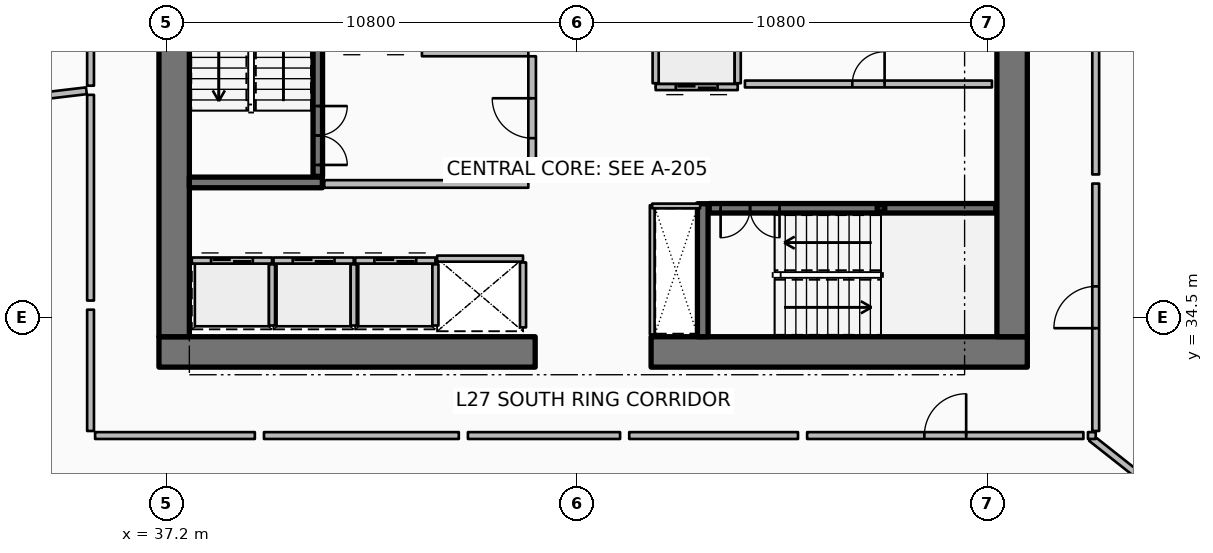
"""IFC4 building model, lengths in metres.
Left out: names, types, materials, properties, quantities, classifications, styles, units other than length and angle.
Written with IfcOpenShell. Run it as: python <this file> out.ifc"""

import sys

from ifc_helpers import new_model, si_unit, direction, frame, frame_2d, origin, origin_2d, place, context, subcontext, project, spatial, rectangle, hollow_rectangle, extrude, element, fill, save


model = new_model("IFC4")
c1 = context("Model", 3, precision=1e-05, world=origin(), true_north=direction((0.0, 1.0)))
c2 = subcontext(c1, "Body", "Model", "MODEL_VIEW")
j1 = project(units=[si_unit("LENGTHUNIT", "METRE"), si_unit("PLANEANGLEUNIT", "RADIAN")], contexts=[c1])
p1 = place(None, origin())
s1 = spatial("IfcSite", under=j1, at=p1, CompositionType="ELEMENT")
p2 = place(p1, origin())
s2 = spatial("IfcBuilding", under=s1, at=p2, CompositionType="ELEMENT")
p3 = place(p2, frame((0.0, 0.0, 108.9)))
s3 = spatial("IfcBuildingStorey", under=s2, at=p3, CompositionType="ELEMENT", Elevation=108.9)
p4 = place(p3, frame((37.0, 33.6, 0.0), z_axis=(0.0, 0.0, 1.0), x_axis=(1.0, 0.0, 0.0)))
e1 = element("IfcWall", 1, at=p4, inside=s3, PredefinedType="SHEAR", context=c2, shape_type="SweptSolid", body=[
    extrude(rectangle(XDim=9.9, YDim=0.8, at=frame_2d((4.95, 0.0))), origin(), (0.0, 0.0, 1.0), 3.75),
])
p5 = place(p3, frame((49.95, 33.6, 0.0), z_axis=(0.0, 0.0, 1.0), x_axis=(1.0, 0.0, 0.0)))
e2 = element("IfcWall", 2, at=p5, inside=s3, PredefinedType="SHEAR", context=c2, shape_type="SweptSolid", body=[
    extrude(rectangle(XDim=9.9, YDim=0.8, at=frame_2d((4.95, 0.0))), origin(), (0.0, 0.0, 1.0), 3.75),
])
for number, where, z_axis, x_axis in (
    (3, (37.4, 34.0, 0.0), (0.0, 0.0, 1.0), (0.0, 1.0, 0.0)),
    (4, (59.45, 34.0, 0.0), (0.0, 0.0, 1.0), (0.0, 1.0, 0.0)),
):
    element("IfcWall", number, at=place(p3, frame(where, z_axis=z_axis, x_axis=x_axis)), inside=s3, PredefinedType="SHEAR", context=c2, shape_type="SweptSolid", body=[
        extrude(rectangle(XDim=16.0, YDim=0.8, at=frame_2d((8.0, 0.0))), origin(), (0.0, 0.0, 1.0), 3.75),
    ])
for number, where, z_axis, x_axis in (
    (5, (37.8, 38.06, 0.0), (0.0, 0.0, 1.0), (1.0, 0.0, 0.0)),
    (6, (51.31, 34.0, 0.0), (0.0, 0.0, 1.0), (0.0, 1.0, 0.0)),
):
    element("IfcWall", number, at=place(p3, frame(where, z_axis=z_axis, x_axis=x_axis)), inside=s3, PredefinedType="SHEAR", context=c2, shape_type="SweptSolid", body=[
        extrude(rectangle(XDim=3.5, YDim=0.28, at=frame_2d((1.75, 0.0))), origin(), (0.0, 0.0, 1.0), 3.75),
    ])
p6 = place(p3, frame((56.0, 37.38, 0.0), z_axis=(0.0, 0.0, 1.0), x_axis=(1.0, 0.0, 0.0)))
e7 = element("IfcColumn", 7, at=p6, inside=s3, PredefinedType="COLUMN", context=c2, shape_type="SweptSolid", body=[
    extrude(hollow_rectangle(XDim=0.2, YDim=0.2, WallThickness=0.01, InnerFilletRadius=0.01, OuterFilletRadius=0.02, at=origin_2d()), origin(), (0.0, 0.0, 1.0), 1.67),
])
p7 = place(p3, frame((41.18, 38.22, 0.0), z_axis=(0.0, 0.0, 1.0), x_axis=(0.0, 1.0, 0.0)))
e8 = element("IfcWall", 8, at=p7, inside=s3, PredefinedType="SOLIDWALL", context=c2, shape_type="SweptSolid", body=[
    extrude(rectangle(XDim=7.56, YDim=0.25, at=frame_2d((3.78, 0.0))), origin(), (0.0, 0.0, 1.0), 3.5),
])
p8 = place(p7, frame((0.3, 0.0, 0.0)))
e9 = element("IfcOpeningElement", 9, at=p8, cuts=e8, PredefinedType="OPENING", context=c2, shape_type="SweptSolid", body=[
    extrude(rectangle(XDim=1.55, YDim=2.15, at=frame_2d((0.775, 1.075))), frame((0.0, 0.135, 0.0), z_axis=(0.0, -1.0, 0.0), x_axis=(1.0, 0.0, 0.0)), (0.0, 0.0, 1.0), 0.27),
])
p9 = place(p3, frame((51.48, 37.38, 0.0), z_axis=(0.0, 0.0, 1.0), x_axis=(1.0, 0.0, 0.0)))
e10 = element("IfcWall", 10, at=p9, inside=s3, PredefinedType="SOLIDWALL", context=c2, shape_type="SweptSolid", body=[
    extrude(rectangle(XDim=7.54, YDim=0.25, at=frame_2d((3.77, 0.0))), origin(), (0.0, 0.0, 1.0), 3.5),
])
p10 = place(p9, frame((0.3, 0.0, 0.0)))
e11 = element("IfcOpeningElement", 11, at=p10, cuts=e10, PredefinedType="OPENING", context=c2, shape_type="SweptSolid", body=[
    extrude(rectangle(XDim=1.55, YDim=2.15, at=frame_2d((0.775, 1.075))), frame((0.0, 0.135, 0.0), z_axis=(0.0, -1.0, 0.0), x_axis=(1.0, 0.0, 0.0)), (0.0, 0.0, 1.0), 0.27),
])
p11 = place(p3, frame((37.865, 36.005, 0.0), z_axis=(0.0, 0.0, 1.0), x_axis=(1.0, 0.0, 0.0)))
e12 = element("IfcWall", 12, at=p11, inside=s3, PredefinedType="PARTITIONING", context=c2, shape_type="SweptSolid", body=[
    extrude(rectangle(XDim=2.11, YDim=0.16, at=frame_2d((1.055, 0.0))), origin(), (0.0, 0.0, 1.0), 3.5),
])
p12 = place(p11, frame((0.505, 0.0, 0.0)))
e13 = element("IfcOpeningElement", 13, at=p12, cuts=e12, PredefinedType="OPENING", context=c2, shape_type="SweptSolid", body=[
    extrude(rectangle(XDim=1.1, YDim=2.1, at=frame_2d((0.55, 1.05))), frame((0.0, 0.09, 0.0), z_axis=(0.0, -1.0, 0.0), x_axis=(1.0, 0.0, 0.0)), (0.0, 0.0, 1.0), 0.18),
])
p13 = place(p3, frame((39.975, 34.295, 0.0), z_axis=(0.0, 0.0, 1.0), x_axis=(0.0, 1.0, 0.0)))
e14 = element("IfcWall", 14, at=p13, inside=s3, PredefinedType="PARTITIONING", context=c2, shape_type="SweptSolid", body=[
    extrude(rectangle(XDim=1.61, YDim=0.16, at=frame_2d((0.805, 0.0))), origin(), (0.0, 0.0, 1.0), 3.5),
])
p14 = place(p3, frame((40.015, 36.005, 0.0), z_axis=(0.0, 0.0, 1.0), x_axis=(1.0, 0.0, 0.0)))
e15 = element("IfcWall", 15, at=p14, inside=s3, PredefinedType="PARTITIONING", context=c2, shape_type="SweptSolid", body=[
    extrude(rectangle(XDim=2.11, YDim=0.16, at=frame_2d((1.055, 0.0))), origin(), (0.0, 0.0, 1.0), 3.5),
])
p15 = place(p14, frame((0.505, 0.0, 0.0)))
e16 = element("IfcOpeningElement", 16, at=p15, cuts=e15, PredefinedType="OPENING", context=c2, shape_type="SweptSolid", body=[
    extrude(rectangle(XDim=1.1, YDim=2.1, at=frame_2d((0.55, 1.05))), frame((0.0, 0.09, 0.0), z_axis=(0.0, -1.0, 0.0), x_axis=(1.0, 0.0, 0.0)), (0.0, 0.0, 1.0), 0.18),
])
p16 = place(p3, frame((42.125, 34.295, 0.0), z_axis=(0.0, 0.0, 1.0), x_axis=(0.0, 1.0, 0.0)))
e17 = element("IfcWall", 17, at=p16, inside=s3, PredefinedType="PARTITIONING", context=c2, shape_type="SweptSolid", body=[
    extrude(rectangle(XDim=1.61, YDim=0.16, at=frame_2d((0.805, 0.0))), origin(), (0.0, 0.0, 1.0), 3.5),
])
p17 = place(p3, frame((42.165, 36.005, 0.0), z_axis=(0.0, 0.0, 1.0), x_axis=(1.0, 0.0, 0.0)))
e18 = element("IfcWall", 18, at=p17, inside=s3, PredefinedType="PARTITIONING", context=c2, shape_type="SweptSolid", body=[
    extrude(rectangle(XDim=2.11, YDim=0.16, at=frame_2d((1.055, 0.0))), origin(), (0.0, 0.0, 1.0), 3.5),
])
p18 = place(p17, frame((0.505, 0.0, 0.0)))
e19 = element("IfcOpeningElement", 19, at=p18, cuts=e18, PredefinedType="OPENING", context=c2, shape_type="SweptSolid", body=[
    extrude(rectangle(XDim=1.1, YDim=2.1, at=frame_2d((0.55, 1.05))), frame((0.0, 0.09, 0.0), z_axis=(0.0, -1.0, 0.0), x_axis=(1.0, 0.0, 0.0)), (0.0, 0.0, 1.0), 0.18),
])
p19 = place(p3, frame((44.275, 34.295, 0.0), z_axis=(0.0, 0.0, 1.0), x_axis=(0.0, 1.0, 0.0)))
e20 = element("IfcWall", 20, at=p19, inside=s3, PredefinedType="PARTITIONING", context=c2, shape_type="SweptSolid", body=[
    extrude(rectangle(XDim=1.61, YDim=0.16, at=frame_2d((0.805, 0.0))), origin(), (0.0, 0.0, 1.0), 3.5),
])
p20 = place(p3, frame((44.32, 36.055, 0.0), z_axis=(0.0, 0.0, 1.0), x_axis=(1.0, 0.0, 0.0)))
e21 = element("IfcWall", 21, at=p20, inside=s3, PredefinedType="PARTITIONING", context=c2, shape_type="SweptSolid", body=[
    extrude(rectangle(XDim=2.26, YDim=0.16, at=frame_2d((1.13, 0.0))), origin(), (0.0, 0.0, 1.0), 3.5),
])
p21 = place(p3, frame((46.58, 34.245, 0.0), z_axis=(0.0, 0.0, 1.0), x_axis=(0.0, 1.0, 0.0)))
e22 = element("IfcWall", 22, at=p21, inside=s3, PredefinedType="PARTITIONING", context=c2, shape_type="SweptSolid", body=[
    extrude(rectangle(XDim=1.71, YDim=0.16, at=frame_2d((0.855, 0.0))), origin(), (0.0, 0.0, 1.0), 3.5),
])
p22 = place(p3, frame((52.23, 40.57, 0.0), z_axis=(0.0, 0.0, 1.0), x_axis=(-1.0, 0.0, 0.0)))
e23 = element("IfcWall", 23, at=p22, inside=s3, PredefinedType="PARTITIONING", context=c2, shape_type="SweptSolid", body=[
    extrude(rectangle(XDim=2.16, YDim=0.16, at=frame_2d((1.08, 0.0))), origin(), (0.0, 0.0, 1.0), 3.5),
])
p23 = place(p22, frame((0.53, 0.0, 0.0)))
e24 = element("IfcOpeningElement", 24, at=p23, cuts=e23, PredefinedType="OPENING", context=c2, shape_type="SweptSolid", body=[
    extrude(rectangle(XDim=1.1, YDim=2.1, at=frame_2d((0.55, 1.05))), frame((0.0, 0.09, 0.0), z_axis=(0.0, -1.0, 0.0), x_axis=(1.0, 0.0, 0.0)), (0.0, 0.0, 1.0), 0.18),
])
for number, where, z_axis, x_axis in (
    (25, (52.23, 40.67, 0.0), (0.0, 0.0, 1.0), (0.0, 1.0, 0.0)),
    (26, (50.07, 40.67, 0.0), (0.0, 0.0, 1.0), (0.0, 1.0, 0.0)),
):
    element("IfcWall", number, at=place(p3, frame(where, z_axis=z_axis, x_axis=x_axis)), inside=s3, PredefinedType="PARTITIONING", context=c2, shape_type="SweptSolid", body=[
        extrude(rectangle(XDim=2.16, YDim=0.16, at=frame_2d((1.08, 0.0))), origin(), (0.0, 0.0, 1.0), 3.5),
    ])
p24 = place(p3, frame((52.42, 40.65, 0.0), z_axis=(0.0, 0.0, 1.0), x_axis=(1.0, 0.0, 0.0)))
e27 = element("IfcWall", 27, at=p24, inside=s3, PredefinedType="PARTITIONING", context=c2, shape_type="SweptSolid", body=[
    extrude(rectangle(XDim=6.5, YDim=0.18, at=frame_2d((3.25, 0.0))), origin(), (0.0, 0.0, 1.0), 3.5),
])
p25 = place(p24, frame((2.825, 0.0, 0.0)))
e28 = element("IfcOpeningElement", 28, at=p25, cuts=e27, PredefinedType="OPENING", context=c2, shape_type="SweptSolid", body=[
    extrude(rectangle(XDim=0.85, YDim=2.06, at=frame_2d((0.425, 1.03))), frame((0.0, 0.1, 0.0), z_axis=(0.0, -1.0, 0.0), x_axis=(1.0, 0.0, 0.0)), (0.0, 0.0, 1.0), 0.2),
])
p26 = place(p3, frame((41.35, 38.02, 0.0), z_axis=(0.0, 0.0, 1.0), x_axis=(1.0, 0.0, 0.0)))
e29 = element("IfcWall", 29, at=p26, inside=s3, PredefinedType="PARTITIONING", context=c2, shape_type="SweptSolid", body=[
    extrude(rectangle(XDim=5.37, YDim=0.2, at=frame_2d((2.685, 0.0))), origin(), (0.0, 0.0, 1.0), 3.5),
])
p27 = place(p3, frame((43.92, 41.48, 0.0), z_axis=(0.0, 0.0, 1.0), x_axis=(1.0, 0.0, 0.0)))
e30 = element("IfcWall", 30, at=p27, inside=s3, PredefinedType="PARTITIONING", context=c2, shape_type="SweptSolid", body=[
    extrude(rectangle(XDim=2.8, YDim=0.2, at=frame_2d((1.4, 0.0))), origin(), (0.0, 0.0, 1.0), 3.5),
])
p28 = place(p3, frame((46.82, 38.12, 0.0), z_axis=(0.0, 0.0, 1.0), x_axis=(0.0, 1.0, 0.0)))
e31 = element("IfcWall", 31, at=p28, inside=s3, PredefinedType="PARTITIONING", context=c2, shape_type="SweptSolid", body=[
    extrude(rectangle(XDim=3.26, YDim=0.2, at=frame_2d((1.63, 0.0))), origin(), (0.0, 0.0, 1.0), 3.5),
])
p29 = place(p28, frame((1.105, 0.0, 0.0)))
e32 = element("IfcOpeningElement", 32, at=p29, cuts=e31, PredefinedType="OPENING", context=c2, shape_type="SweptSolid", body=[
    extrude(rectangle(XDim=1.05, YDim=2.1, at=frame_2d((0.525, 1.05))), frame((0.0, 0.11, 0.0), z_axis=(0.0, -1.0, 0.0), x_axis=(1.0, 0.0, 0.0)), (0.0, 0.0, 1.0), 0.22),
])
p30 = place(p3, frame((49.98, 34.06, 0.0), z_axis=(0.0, 0.0, 1.0), x_axis=(0.0, 1.0, 0.0)))
e33 = element("IfcWall", 33, at=p30, inside=s3, PredefinedType="PARTITIONING", context=c2, shape_type="SweptSolid", body=[
    extrude(rectangle(XDim=3.4, YDim=0.125, at=frame_2d((1.7, 0.0))), origin(), (0.0, 0.0, 1.0), 2.94),
])
p31 = place(p3, frame((49.98, 37.44, 0.0), z_axis=(0.0, 0.0, 1.0), x_axis=(1.0, 0.0, 0.0)))
e34 = element("IfcWall", 34, at=p31, inside=s3, PredefinedType="PARTITIONING", context=c2, shape_type="SweptSolid", body=[
    extrude(rectangle(XDim=1.26, YDim=0.125, at=frame_2d((0.63, 0.0))), origin(), (0.0, 0.0, 1.0), 2.94),
])
p32 = place(p3, frame((35.091, 40.472, 0.0), z_axis=(0.0, 0.0, 1.0), x_axis=(-0.99306845132, -0.117537445069, 0.0)))
e35 = element("IfcWall", 35, at=p32, inside=s3, PredefinedType="PARTITIONING", context=c2, shape_type="SweptSolid", body=[
    extrude(rectangle(XDim=16.48, YDim=0.18, at=frame_2d((8.24, 0.0))), origin(), (0.0, 0.0, 1.0), 2.94),
])
p33 = place(p3, frame((61.532, 31.332, 0.0), z_axis=(0.0, 0.0, 1.0), x_axis=(0.785307944478, -0.619105348337, 0.0)))
e36 = element("IfcWall", 36, at=p33, inside=s3, PredefinedType="PARTITIONING", context=c2, shape_type="SweptSolid", body=[
    extrude(rectangle(XDim=9.006, YDim=0.18, at=frame_2d((4.503, 0.0))), origin(), (0.0, 0.0, 1.0), 2.94),
])
p34 = place(p3, frame((35.2, 45.49, 0.0), z_axis=(0.0, 0.0, 1.0), x_axis=(0.0, -1.0, 0.0)))
e37 = element("IfcWall", 37, at=p34, inside=s3, PredefinedType="PARTITIONING", context=c2, shape_type="SweptSolid", body=[
    extrude(rectangle(XDim=4.885, YDim=0.18, at=frame_2d((2.442, 0.0))), origin(), (0.0, 0.0, 1.0), 2.94),
])
p35 = place(p3, frame((54.056, 31.4, 0.0), z_axis=(0.0, 0.0, 1.0), x_axis=(1.0, 0.0, 0.0)))
e38 = element("IfcWall", 38, at=p35, inside=s3, PredefinedType="PARTITIONING", context=c2, shape_type="SweptSolid", body=[
    extrude(rectangle(XDim=7.27, YDim=0.18, at=frame_2d((3.635, 0.0))), origin(), (0.0, 0.0, 1.0), 2.94),
])
p36 = place(p35, frame((3.085, 0.0, 0.0)))
e39 = element("IfcOpeningElement", 39, at=p36, cuts=e38, PredefinedType="OPENING", context=c2, shape_type="SweptSolid", body=[
    extrude(rectangle(XDim=1.1, YDim=2.1, at=frame_2d((0.55, 1.05))), frame((0.0, 0.1, 0.0), z_axis=(0.0, -1.0, 0.0), x_axis=(1.0, 0.0, 0.0)), (0.0, 0.0, 1.0), 0.2),
])
p37 = place(p3, frame((35.2, 40.365, 0.0), z_axis=(0.0, 0.0, 1.0), x_axis=(0.0, -1.0, 0.0)))
e40 = element("IfcWall", 40, at=p37, inside=s3, PredefinedType="PARTITIONING", context=c2, shape_type="SweptSolid", body=[
    extrude(rectangle(XDim=5.413, YDim=0.18, at=frame_2d((2.707, 0.0))), origin(), (0.0, 0.0, 1.0), 2.94),
])
p38 = place(p3, frame((35.2, 34.712, 0.0), z_axis=(0.0, 0.0, 1.0), x_axis=(0.0, -1.0, 0.0)))
e41 = element("IfcWall", 41, at=p38, inside=s3, PredefinedType="PARTITIONING", context=c2, shape_type="SweptSolid", body=[
    extrude(rectangle(XDim=3.192, YDim=0.18, at=frame_2d((1.596, 0.0))), origin(), (0.0, 0.0, 1.0), 2.94),
])
p39 = place(p3, frame((35.32, 31.4, 0.0), z_axis=(0.0, 0.0, 1.0), x_axis=(1.0, 0.0, 0.0)))
e42 = element("IfcWall", 42, at=p39, inside=s3, PredefinedType="PARTITIONING", context=c2, shape_type="SweptSolid", body=[
    extrude(rectangle(XDim=4.204, YDim=0.18, at=frame_2d((2.102, 0.0))), origin(), (0.0, 0.0, 1.0), 2.94),
])
p40 = place(p3, frame((39.764, 31.4, 0.0), z_axis=(0.0, 0.0, 1.0), x_axis=(1.0, 0.0, 0.0)))
e43 = element("IfcWall", 43, at=p40, inside=s3, PredefinedType="PARTITIONING", context=c2, shape_type="SweptSolid", body=[
    extrude(rectangle(XDim=5.127, YDim=0.18, at=frame_2d((2.563, 0.0))), origin(), (0.0, 0.0, 1.0), 2.94),
])
p41 = place(p3, frame((45.131, 31.4, 0.0), z_axis=(0.0, 0.0, 1.0), x_axis=(1.0, 0.0, 0.0)))
e44 = element("IfcWall", 44, at=p41, inside=s3, PredefinedType="PARTITIONING", context=c2, shape_type="SweptSolid", body=[
    extrude(rectangle(XDim=4.004, YDim=0.18, at=frame_2d((2.002, 0.0))), origin(), (0.0, 0.0, 1.0), 2.94),
])
p42 = place(p3, frame((49.375, 31.4, 0.0), z_axis=(0.0, 0.0, 1.0), x_axis=(1.0, 0.0, 0.0)))
e45 = element("IfcWall", 45, at=p42, inside=s3, PredefinedType="PARTITIONING", context=c2, shape_type="SweptSolid", body=[
    extrude(rectangle(XDim=4.442, YDim=0.18, at=frame_2d((2.221, 0.0))), origin(), (0.0, 0.0, 1.0), 2.94),
])
p43 = place(p3, frame((61.446, 31.4, 0.0), z_axis=(0.0, 0.0, 1.0), x_axis=(1.0, 0.0, 0.0)))
e46 = element("IfcWall", 46, at=p43, inside=s3, PredefinedType="PARTITIONING", context=c2, shape_type="SweptSolid", body=[
    extrude(rectangle(XDim=0.204, YDim=0.18, at=frame_2d((0.102, 0.0))), origin(), (0.0, 0.0, 1.0), 2.94),
])
p44 = place(p3, frame((61.65, 31.52, 0.0), z_axis=(0.0, 0.0, 1.0), x_axis=(0.0, 1.0, 0.0)))
e47 = element("IfcWall", 47, at=p44, inside=s3, PredefinedType="PARTITIONING", context=c2, shape_type="SweptSolid", body=[
    extrude(rectangle(XDim=6.51, YDim=0.18, at=frame_2d((3.255, 0.0))), origin(), (0.0, 0.0, 1.0), 2.94),
])
p45 = place(p44, frame((2.705, 0.0, 0.0)))
e48 = element("IfcOpeningElement", 48, at=p45, cuts=e47, PredefinedType="OPENING", context=c2, shape_type="SweptSolid", body=[
    extrude(rectangle(XDim=1.1, YDim=2.1, at=frame_2d((0.55, 1.05))), frame((0.0, 0.1, 0.0), z_axis=(0.0, -1.0, 0.0), x_axis=(1.0, 0.0, 0.0)), (0.0, 0.0, 1.0), 0.2),
])
p46 = place(p3, frame((61.65, 38.27, 0.0), z_axis=(0.0, 0.0, 1.0), x_axis=(0.0, 1.0, 0.0)))
e49 = element("IfcWall", 49, at=p46, inside=s3, PredefinedType="PARTITIONING", context=c2, shape_type="SweptSolid", body=[
    extrude(rectangle(XDim=5.225, YDim=0.18, at=frame_2d((2.613, 0.0))), origin(), (0.0, 0.0, 1.0), 2.94),
])
p47 = place(p8, origin())
e50 = element("IfcDoor", 50, at=p47, inside=s3, OperationType="DOUBLE_DOOR_SINGLE_SWING", PredefinedType="DOOR", context=c2, shape_type="SweptSolid", body=[
    extrude(rectangle(XDim=1.55, YDim=2.15, at=frame_2d((0.775, 1.075))), frame((0.0, 0.025, 0.0), z_axis=(0.0, -1.0, 0.0), x_axis=(1.0, 0.0, 0.0)), (0.0, 0.0, 1.0), 0.05),
])
fill(e9, e50)
p48 = place(p10, origin())
e51 = element("IfcDoor", 51, at=p48, inside=s3, OperationType="DOUBLE_DOOR_SINGLE_SWING", PredefinedType="DOOR", context=c2, shape_type="SweptSolid", body=[
    extrude(rectangle(XDim=1.55, YDim=2.15, at=frame_2d((0.775, 1.075))), frame((0.0, 0.025, 0.0), z_axis=(0.0, -1.0, 0.0), x_axis=(1.0, 0.0, 0.0)), (0.0, 0.0, 1.0), 0.05),
])
fill(e11, e51)
p49 = place(p12, origin())
e52 = element("IfcDoor", 52, at=p49, inside=s3, OperationType="DOUBLE_DOOR_SLIDING", PredefinedType="DOOR", context=c2, shape_type="SweptSolid", body=[
    extrude(rectangle(XDim=1.1, YDim=2.1, at=frame_2d((0.55, 1.05))), frame((0.0, 0.025, 0.0), z_axis=(0.0, -1.0, 0.0), x_axis=(1.0, 0.0, 0.0)), (0.0, 0.0, 1.0), 0.05),
])
fill(e13, e52)
p50 = place(p15, origin())
e53 = element("IfcDoor", 53, at=p50, inside=s3, OperationType="DOUBLE_DOOR_SLIDING", PredefinedType="DOOR", context=c2, shape_type="SweptSolid", body=[
    extrude(rectangle(XDim=1.1, YDim=2.1, at=frame_2d((0.55, 1.05))), frame((0.0, 0.025, 0.0), z_axis=(0.0, -1.0, 0.0), x_axis=(1.0, 0.0, 0.0)), (0.0, 0.0, 1.0), 0.05),
])
fill(e16, e53)
p51 = place(p18, origin())
e54 = element("IfcDoor", 54, at=p51, inside=s3, OperationType="DOUBLE_DOOR_SLIDING", PredefinedType="DOOR", context=c2, shape_type="SweptSolid", body=[
    extrude(rectangle(XDim=1.1, YDim=2.1, at=frame_2d((0.55, 1.05))), frame((0.0, 0.025, 0.0), z_axis=(0.0, -1.0, 0.0), x_axis=(1.0, 0.0, 0.0)), (0.0, 0.0, 1.0), 0.05),
])
fill(e19, e54)
p52 = place(p23, origin())
e55 = element("IfcDoor", 55, at=p52, inside=s3, OperationType="DOUBLE_DOOR_SLIDING", PredefinedType="DOOR", context=c2, shape_type="SweptSolid", body=[
    extrude(rectangle(XDim=1.1, YDim=2.1, at=frame_2d((0.55, 1.05))), frame((0.0, 0.025, 0.0), z_axis=(0.0, -1.0, 0.0), x_axis=(1.0, 0.0, 0.0)), (0.0, 0.0, 1.0), 0.05),
])
fill(e24, e55)
p53 = place(p25, origin())
e56 = element("IfcDoor", 56, at=p53, inside=s3, OperationType="SINGLE_SWING_RIGHT", PredefinedType="DOOR", context=c2, shape_type="SweptSolid", body=[
    extrude(rectangle(XDim=0.85, YDim=2.06, at=frame_2d((0.425, 1.03))), frame((0.0, 0.025, 0.0), z_axis=(0.0, -1.0, 0.0), x_axis=(1.0, 0.0, 0.0)), (0.0, 0.0, 1.0), 0.05),
])
fill(e28, e56)
p54 = place(p29, origin())
e57 = element("IfcDoor", 57, at=p54, inside=s3, OperationType="SINGLE_SWING_RIGHT", PredefinedType="DOOR", context=c2, shape_type="SweptSolid", body=[
    extrude(rectangle(XDim=1.05, YDim=2.1, at=frame_2d((0.525, 1.05))), frame((0.0, 0.025, 0.0), z_axis=(0.0, -1.0, 0.0), x_axis=(1.0, 0.0, 0.0)), (0.0, 0.0, 1.0), 0.05),
])
fill(e32, e57)
p55 = place(p36, origin())
e58 = element("IfcDoor", 58, at=p55, inside=s3, OperationType="SINGLE_SWING_RIGHT", PredefinedType="DOOR", context=c2, shape_type="SweptSolid", body=[
    extrude(rectangle(XDim=1.1, YDim=2.1, at=frame_2d((0.55, 1.05))), frame((0.0, 0.025, 0.0), z_axis=(0.0, -1.0, 0.0), x_axis=(1.0, 0.0, 0.0)), (0.0, 0.0, 1.0), 0.05),
])
fill(e39, e58)
p56 = place(p45, origin())
e59 = element("IfcDoor", 59, at=p56, inside=s3, OperationType="SINGLE_SWING_LEFT", PredefinedType="DOOR", context=c2, shape_type="SweptSolid", body=[
    extrude(rectangle(XDim=1.1, YDim=2.1, at=frame_2d((0.55, 1.05))), frame((0.0, 0.025, 0.0), z_axis=(0.0, -1.0, 0.0), x_axis=(1.0, 0.0, 0.0)), (0.0, 0.0, 1.0), 0.05),
])
fill(e48, e59)
save(model, sys.argv[1])
